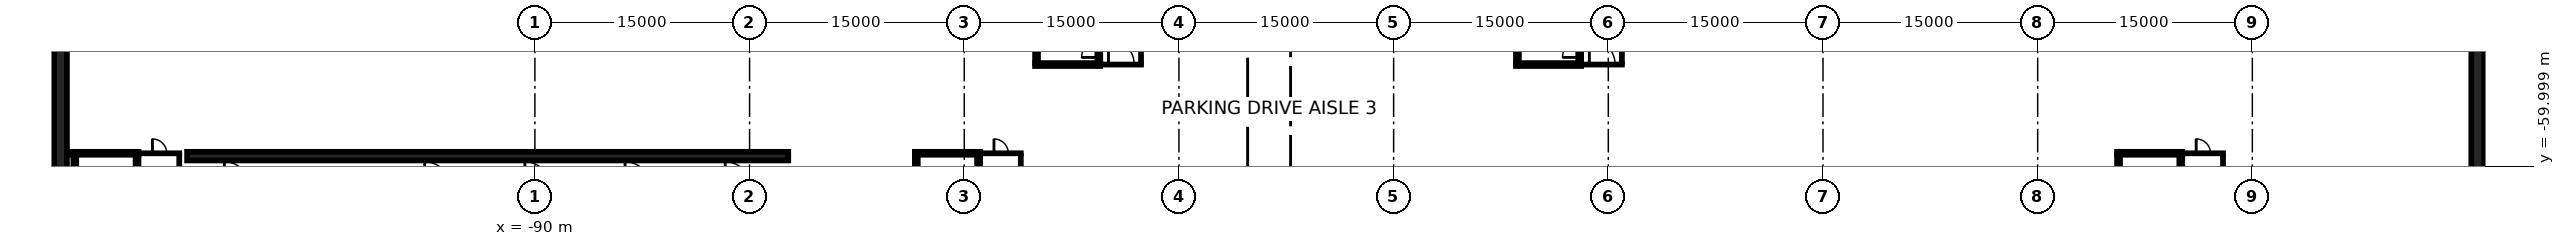
"""IFC4 building model, lengths in metres.
Left out: names, types, materials, properties, quantities, classifications, styles, units other than length and angle.
Written with IfcOpenShell. Run it as: python <this file> out.ifc"""

import sys

from ifc_helpers import new_model, si_unit, direction, frame, frame_2d, origin, place, context, subcontext, project, spatial, rectangle, extrude, element, fill, save


model = new_model("IFC4")
c1 = context("Model", 3, precision=1e-05, world=origin(), true_north=direction((0.0, 1.0)))
c2 = subcontext(c1, "Body", "Model", "MODEL_VIEW")
j1 = project(units=[si_unit("LENGTHUNIT", "METRE"), si_unit("PLANEANGLEUNIT", "RADIAN")], contexts=[c1])
p1 = place(None, origin())
s1 = spatial("IfcSite", under=j1, at=p1, CompositionType="ELEMENT")
p2 = place(p1, origin())
s2 = spatial("IfcBuilding", under=s1, at=p2, CompositionType="ELEMENT")
p3 = place(p2, frame((0.0, 0.0, -12.0)))
s3 = spatial("IfcBuildingStorey", under=s2, at=p3, CompositionType="ELEMENT", Elevation=-12.0)
for number, where, z_axis, x_axis in (
    (1, (-123.15, -80.0, 0.0), (0.0, 0.0, 1.0), (0.0, 1.0, 0.0)),
    (2, (45.75, -80.0, 0.0), (0.0, 0.0, 1.0), (0.0, 1.0, 0.0)),
):
    element("IfcWall", number, at=place(p3, frame(where, z_axis=z_axis, x_axis=x_axis)), inside=s3, PredefinedType="USERDEFINED", context=c2, shape_type="SweptSolid", body=[
        extrude(rectangle(XDim=160.0, YDim=0.9, at=frame_2d((80.0, 0.0))), origin(), (0.0, 0.0, 1.0), 11.55),
    ])
p4 = place(p3, frame((-58.9, -59.1, 0.0), z_axis=(0.0, 0.0, 1.0), x_axis=(1.0, 0.0, 0.0)))
e3 = element("IfcWall", 3, at=p4, inside=s3, PredefinedType="PARTITIONING", context=c2, shape_type="SweptSolid", body=[
    extrude(rectangle(XDim=2.95, YDim=0.2, at=frame_2d((1.475, 0.0))), origin(), (0.0, 0.0, 1.0), 4.4),
])
p5 = place(p4, frame((0.975, 0.0, 0.0)))
e4 = element("IfcOpeningElement", 4, at=p5, cuts=e3, PredefinedType="OPENING", context=c2, shape_type="SweptSolid", body=[
    extrude(rectangle(XDim=1.0, YDim=2.1, at=frame_2d((0.5, 1.05))), frame((0.0, 0.11, 0.0), z_axis=(0.0, -1.0, 0.0), x_axis=(1.0, 0.0, 0.0)), (0.0, 0.0, 1.0), 0.22),
])
p6 = place(p3, frame((-56.05, -64.8, 0.0), z_axis=(0.0, 0.0, 1.0), x_axis=(0.0, 1.0, 0.0)))
e5 = element("IfcWall", 5, at=p6, inside=s3, PredefinedType="PARTITIONING", context=c2, shape_type="SweptSolid", body=[
    extrude(rectangle(XDim=5.6, YDim=0.2, at=frame_2d((2.8, 0.0))), origin(), (0.0, 0.0, 1.0), 4.4),
])
p7 = place(p3, frame((-50.5, -52.9, 0.0), z_axis=(0.0, 0.0, 1.0), x_axis=(1.0, 0.0, 0.0)))
e6 = element("IfcWall", 6, at=p7, inside=s3, PredefinedType="PARTITIONING", context=c2, shape_type="SweptSolid", body=[
    extrude(rectangle(XDim=2.95, YDim=0.2, at=frame_2d((1.475, 0.0))), origin(), (0.0, 0.0, 1.0), 4.4),
])
p8 = place(p7, frame((0.575, 0.0, 0.0)))
e7 = element("IfcOpeningElement", 7, at=p8, cuts=e6, PredefinedType="OPENING", context=c2, shape_type="SweptSolid", body=[
    extrude(rectangle(XDim=1.8, YDim=2.1, at=frame_2d((0.9, 1.05))), frame((0.0, 0.11, 0.0), z_axis=(0.0, -1.0, 0.0), x_axis=(1.0, 0.0, 0.0)), (0.0, 0.0, 1.0), 0.22),
])
p9 = place(p3, frame((-47.65, -52.8, 0.0), z_axis=(0.0, 0.0, 1.0), x_axis=(0.0, 1.0, 0.0)))
e8 = element("IfcWall", 8, at=p9, inside=s3, PredefinedType="PARTITIONING", context=c2, shape_type="SweptSolid", body=[
    extrude(rectangle(XDim=3.6, YDim=0.2, at=frame_2d((1.8, 0.0))), origin(), (0.0, 0.0, 1.0), 4.4),
])
p10 = place(p3, frame((-16.9, -52.9, 0.0), z_axis=(0.0, 0.0, 1.0), x_axis=(1.0, 0.0, 0.0)))
e9 = element("IfcWall", 9, at=p10, inside=s3, PredefinedType="PARTITIONING", context=c2, shape_type="SweptSolid", body=[
    extrude(rectangle(XDim=2.95, YDim=0.2, at=frame_2d((1.475, 0.0))), origin(), (0.0, 0.0, 1.0), 4.4),
])
p11 = place(p10, frame((0.575, 0.0, 0.0)))
e10 = element("IfcOpeningElement", 10, at=p11, cuts=e9, PredefinedType="OPENING", context=c2, shape_type="SweptSolid", body=[
    extrude(rectangle(XDim=1.8, YDim=2.1, at=frame_2d((0.9, 1.05))), frame((0.0, 0.11, 0.0), z_axis=(0.0, -1.0, 0.0), x_axis=(1.0, 0.0, 0.0)), (0.0, 0.0, 1.0), 0.22),
])
p12 = place(p3, frame((-14.05, -52.8, 0.0), z_axis=(0.0, 0.0, 1.0), x_axis=(0.0, 1.0, 0.0)))
e11 = element("IfcWall", 11, at=p12, inside=s3, PredefinedType="PARTITIONING", context=c2, shape_type="SweptSolid", body=[
    extrude(rectangle(XDim=3.6, YDim=0.2, at=frame_2d((1.8, 0.0))), origin(), (0.0, 0.0, 1.0), 4.4),
])
p13 = place(p3, frame((25.1, -59.1, 0.0), z_axis=(0.0, 0.0, 1.0), x_axis=(1.0, 0.0, 0.0)))
e12 = element("IfcWall", 12, at=p13, inside=s3, PredefinedType="PARTITIONING", context=c2, shape_type="SweptSolid", body=[
    extrude(rectangle(XDim=2.95, YDim=0.2, at=frame_2d((1.475, 0.0))), origin(), (0.0, 0.0, 1.0), 4.4),
])
p14 = place(p13, frame((0.975, 0.0, 0.0)))
e13 = element("IfcOpeningElement", 13, at=p14, cuts=e12, PredefinedType="OPENING", context=c2, shape_type="SweptSolid", body=[
    extrude(rectangle(XDim=1.0, YDim=2.1, at=frame_2d((0.5, 1.05))), frame((0.0, 0.11, 0.0), z_axis=(0.0, -1.0, 0.0), x_axis=(1.0, 0.0, 0.0)), (0.0, 0.0, 1.0), 0.22),
])
p15 = place(p3, frame((27.95, -64.8, 0.0), z_axis=(0.0, 0.0, 1.0), x_axis=(0.0, 1.0, 0.0)))
e14 = element("IfcWall", 14, at=p15, inside=s3, PredefinedType="PARTITIONING", context=c2, shape_type="SweptSolid", body=[
    extrude(rectangle(XDim=5.6, YDim=0.2, at=frame_2d((2.8, 0.0))), origin(), (0.0, 0.0, 1.0), 4.4),
])
p16 = place(p3, frame((-117.7, -59.1, 0.0), z_axis=(0.0, 0.0, 1.0), x_axis=(1.0, 0.0, 0.0)))
e15 = element("IfcWall", 15, at=p16, inside=s3, PredefinedType="PARTITIONING", context=c2, shape_type="SweptSolid", body=[
    extrude(rectangle(XDim=2.95, YDim=0.2, at=frame_2d((1.475, 0.0))), origin(), (0.0, 0.0, 1.0), 4.4),
])
p17 = place(p16, frame((0.975, 0.0, 0.0)))
e16 = element("IfcOpeningElement", 16, at=p17, cuts=e15, PredefinedType="OPENING", context=c2, shape_type="SweptSolid", body=[
    extrude(rectangle(XDim=1.0, YDim=2.1, at=frame_2d((0.5, 1.05))), frame((0.0, 0.11, 0.0), z_axis=(0.0, -1.0, 0.0), x_axis=(1.0, 0.0, 0.0)), (0.0, 0.0, 1.0), 0.22),
])
p18 = place(p3, frame((-114.85, -64.8, 0.0), z_axis=(0.0, 0.0, 1.0), x_axis=(0.0, 1.0, 0.0)))
e17 = element("IfcWall", 17, at=p18, inside=s3, PredefinedType="PARTITIONING", context=c2, shape_type="SweptSolid", body=[
    extrude(rectangle(XDim=5.6, YDim=0.2, at=frame_2d((2.8, 0.0))), origin(), (0.0, 0.0, 1.0), 4.4),
])
p19 = place(p3, frame((-63.35, -68.8, 0.0), z_axis=(0.0, 0.0, 1.0), x_axis=(0.0, 1.0, 0.0)))
e18 = element("IfcWall", 18, at=p19, inside=s3, PredefinedType="SOLIDWALL", context=c2, shape_type="SweptSolid", body=[
    extrude(rectangle(XDim=9.6, YDim=0.2, at=frame_2d((4.8, 0.0))), origin(), (0.0, 0.0, 1.0), 4.4),
])
p20 = place(p3, frame((-59.0, -68.8, 0.0), z_axis=(0.0, 0.0, 1.0), x_axis=(0.0, 1.0, 0.0)))
e19 = element("IfcWall", 19, at=p20, inside=s3, PredefinedType="SOLIDWALL", context=c2, shape_type="SweptSolid", body=[
    extrude(rectangle(XDim=9.6, YDim=0.2, at=frame_2d((4.8, 0.0))), origin(), (0.0, 0.0, 1.0), 4.4),
])
p21 = place(p20, frame((0.4, 0.0, 0.0)))
e20 = element("IfcOpeningElement", 20, at=p21, cuts=e19, PredefinedType="OPENING", context=c2, shape_type="SweptSolid", body=[
    extrude(rectangle(XDim=1.2, YDim=2.1, at=frame_2d((0.6, 1.05))), frame((0.0, 0.11, 0.0), z_axis=(0.0, -1.0, 0.0), x_axis=(1.0, 0.0, 0.0)), (0.0, 0.0, 1.0), 0.22),
])
p22 = place(p3, frame((-63.45, -59.1, 0.0), z_axis=(0.0, 0.0, 1.0), x_axis=(1.0, 0.0, 0.0)))
e21 = element("IfcWall", 21, at=p22, inside=s3, PredefinedType="SOLIDWALL", context=c2, shape_type="SweptSolid", body=[
    extrude(rectangle(XDim=4.55, YDim=0.2, at=frame_2d((2.275, 0.0))), origin(), (0.0, 0.0, 1.0), 4.4),
])
p23 = place(p3, frame((-54.95, -52.8, 0.0), z_axis=(0.0, 0.0, 1.0), x_axis=(0.0, 1.0, 0.0)))
e22 = element("IfcWall", 22, at=p23, inside=s3, PredefinedType="SOLIDWALL", context=c2, shape_type="SweptSolid", body=[
    extrude(rectangle(XDim=9.6, YDim=0.2, at=frame_2d((4.8, 0.0))), origin(), (0.0, 0.0, 1.0), 4.4),
])
p24 = place(p3, frame((-50.6, -52.8, 0.0), z_axis=(0.0, 0.0, 1.0), x_axis=(0.0, 1.0, 0.0)))
e23 = element("IfcWall", 23, at=p24, inside=s3, PredefinedType="SOLIDWALL", context=c2, shape_type="SweptSolid", body=[
    extrude(rectangle(XDim=9.6, YDim=0.2, at=frame_2d((4.8, 0.0))), origin(), (0.0, 0.0, 1.0), 4.4),
])
p25 = place(p24, frame((0.4, 0.0, 0.0)))
e24 = element("IfcOpeningElement", 24, at=p25, cuts=e23, PredefinedType="OPENING", context=c2, shape_type="SweptSolid", body=[
    extrude(rectangle(XDim=1.2, YDim=2.1, at=frame_2d((0.6, 1.05))), frame((0.0, 0.11, 0.0), z_axis=(0.0, -1.0, 0.0), x_axis=(1.0, 0.0, 0.0)), (0.0, 0.0, 1.0), 0.22),
])
p26 = place(p3, frame((-50.5, -52.9, 0.0), z_axis=(0.0, 0.0, 1.0), x_axis=(-1.0, 0.0, 0.0)))
e25 = element("IfcWall", 25, at=p26, inside=s3, PredefinedType="SOLIDWALL", context=c2, shape_type="SweptSolid", body=[
    extrude(rectangle(XDim=4.55, YDim=0.2, at=frame_2d((2.275, 0.0))), origin(), (0.0, 0.0, 1.0), 4.4),
])
p27 = place(p3, frame((-21.35, -52.8, 0.0), z_axis=(0.0, 0.0, 1.0), x_axis=(0.0, 1.0, 0.0)))
e26 = element("IfcWall", 26, at=p27, inside=s3, PredefinedType="SOLIDWALL", context=c2, shape_type="SweptSolid", body=[
    extrude(rectangle(XDim=9.6, YDim=0.2, at=frame_2d((4.8, 0.0))), origin(), (0.0, 0.0, 1.0), 4.4),
])
p28 = place(p3, frame((-17.0, -52.8, 0.0), z_axis=(0.0, 0.0, 1.0), x_axis=(0.0, 1.0, 0.0)))
e27 = element("IfcWall", 27, at=p28, inside=s3, PredefinedType="SOLIDWALL", context=c2, shape_type="SweptSolid", body=[
    extrude(rectangle(XDim=9.6, YDim=0.2, at=frame_2d((4.8, 0.0))), origin(), (0.0, 0.0, 1.0), 4.4),
])
p29 = place(p28, frame((0.4, 0.0, 0.0)))
e28 = element("IfcOpeningElement", 28, at=p29, cuts=e27, PredefinedType="OPENING", context=c2, shape_type="SweptSolid", body=[
    extrude(rectangle(XDim=1.2, YDim=2.1, at=frame_2d((0.6, 1.05))), frame((0.0, 0.11, 0.0), z_axis=(0.0, -1.0, 0.0), x_axis=(1.0, 0.0, 0.0)), (0.0, 0.0, 1.0), 0.22),
])
p30 = place(p3, frame((-16.9, -52.9, 0.0), z_axis=(0.0, 0.0, 1.0), x_axis=(-1.0, 0.0, 0.0)))
e29 = element("IfcWall", 29, at=p30, inside=s3, PredefinedType="SOLIDWALL", context=c2, shape_type="SweptSolid", body=[
    extrude(rectangle(XDim=4.55, YDim=0.2, at=frame_2d((2.275, 0.0))), origin(), (0.0, 0.0, 1.0), 4.4),
])
p31 = place(p3, frame((20.65, -68.8, 0.0), z_axis=(0.0, 0.0, 1.0), x_axis=(0.0, 1.0, 0.0)))
e30 = element("IfcWall", 30, at=p31, inside=s3, PredefinedType="SOLIDWALL", context=c2, shape_type="SweptSolid", body=[
    extrude(rectangle(XDim=9.6, YDim=0.2, at=frame_2d((4.8, 0.0))), origin(), (0.0, 0.0, 1.0), 4.4),
])
p32 = place(p3, frame((25.0, -68.8, 0.0), z_axis=(0.0, 0.0, 1.0), x_axis=(0.0, 1.0, 0.0)))
e31 = element("IfcWall", 31, at=p32, inside=s3, PredefinedType="SOLIDWALL", context=c2, shape_type="SweptSolid", body=[
    extrude(rectangle(XDim=9.6, YDim=0.2, at=frame_2d((4.8, 0.0))), origin(), (0.0, 0.0, 1.0), 4.4),
])
p33 = place(p32, frame((0.4, 0.0, 0.0)))
e32 = element("IfcOpeningElement", 32, at=p33, cuts=e31, PredefinedType="OPENING", context=c2, shape_type="SweptSolid", body=[
    extrude(rectangle(XDim=1.2, YDim=2.1, at=frame_2d((0.6, 1.05))), frame((0.0, 0.11, 0.0), z_axis=(0.0, -1.0, 0.0), x_axis=(1.0, 0.0, 0.0)), (0.0, 0.0, 1.0), 0.22),
])
p34 = place(p3, frame((20.55, -59.1, 0.0), z_axis=(0.0, 0.0, 1.0), x_axis=(1.0, 0.0, 0.0)))
e33 = element("IfcWall", 33, at=p34, inside=s3, PredefinedType="SOLIDWALL", context=c2, shape_type="SweptSolid", body=[
    extrude(rectangle(XDim=4.55, YDim=0.2, at=frame_2d((2.275, 0.0))), origin(), (0.0, 0.0, 1.0), 4.4),
])
p35 = place(p3, frame((-122.15, -68.8, 0.0), z_axis=(0.0, 0.0, 1.0), x_axis=(0.0, 1.0, 0.0)))
e34 = element("IfcWall", 34, at=p35, inside=s3, PredefinedType="SOLIDWALL", context=c2, shape_type="SweptSolid", body=[
    extrude(rectangle(XDim=9.6, YDim=0.2, at=frame_2d((4.8, 0.0))), origin(), (0.0, 0.0, 1.0), 4.4),
])
p36 = place(p3, frame((-117.8, -68.8, 0.0), z_axis=(0.0, 0.0, 1.0), x_axis=(0.0, 1.0, 0.0)))
e35 = element("IfcWall", 35, at=p36, inside=s3, PredefinedType="SOLIDWALL", context=c2, shape_type="SweptSolid", body=[
    extrude(rectangle(XDim=9.6, YDim=0.2, at=frame_2d((4.8, 0.0))), origin(), (0.0, 0.0, 1.0), 4.4),
])
p37 = place(p36, frame((0.4, 0.0, 0.0)))
e36 = element("IfcOpeningElement", 36, at=p37, cuts=e35, PredefinedType="OPENING", context=c2, shape_type="SweptSolid", body=[
    extrude(rectangle(XDim=1.2, YDim=2.1, at=frame_2d((0.6, 1.05))), frame((0.0, 0.11, 0.0), z_axis=(0.0, -1.0, 0.0), x_axis=(1.0, 0.0, 0.0)), (0.0, 0.0, 1.0), 0.22),
])
p38 = place(p3, frame((-122.7, -59.1, 0.0), z_axis=(0.0, 0.0, 1.0), x_axis=(1.0, 0.0, 0.0)))
e37 = element("IfcWall", 37, at=p38, inside=s3, PredefinedType="SOLIDWALL", context=c2, shape_type="SweptSolid", body=[
    extrude(rectangle(XDim=5.0, YDim=0.2, at=frame_2d((2.5, 0.0))), origin(), (0.0, 0.0, 1.0), 4.4),
])
p39 = place(p3, frame((-114.3, -59.3, 0.0), z_axis=(0.0, 0.0, 1.0), x_axis=(1.0, 0.0, 0.0)))
e38 = element("IfcWall", 38, at=p39, inside=s3, PredefinedType="SOLIDWALL", context=c2, shape_type="SweptSolid", body=[
    extrude(rectangle(XDim=42.0, YDim=0.6, at=frame_2d((21.0, 0.0))), origin(), (0.0, 0.0, 1.0), 4.4),
])
p40 = place(p5, origin())
e39 = element("IfcDoor", 39, at=p40, inside=s3, OperationType="SINGLE_SWING_LEFT", PredefinedType="DOOR", context=c2, shape_type="SweptSolid", body=[
    extrude(rectangle(XDim=1.0, YDim=2.1, at=frame_2d((0.5, 1.05))), frame((0.0, 0.025, 0.0), z_axis=(0.0, -1.0, 0.0), x_axis=(1.0, 0.0, 0.0)), (0.0, 0.0, 1.0), 0.05),
])
fill(e4, e39)
p41 = place(p8, origin())
e40 = element("IfcDoor", 40, at=p41, inside=s3, OperationType="DOUBLE_DOOR_SINGLE_SWING", PredefinedType="DOOR", context=c2, shape_type="SweptSolid", body=[
    extrude(rectangle(XDim=1.8, YDim=2.1, at=frame_2d((0.9, 1.05))), frame((0.0, 0.025, 0.0), z_axis=(0.0, -1.0, 0.0), x_axis=(1.0, 0.0, 0.0)), (0.0, 0.0, 1.0), 0.05),
])
fill(e7, e40)
p42 = place(p11, origin())
e41 = element("IfcDoor", 41, at=p42, inside=s3, OperationType="DOUBLE_DOOR_SINGLE_SWING", PredefinedType="DOOR", context=c2, shape_type="SweptSolid", body=[
    extrude(rectangle(XDim=1.8, YDim=2.1, at=frame_2d((0.9, 1.05))), frame((0.0, 0.025, 0.0), z_axis=(0.0, -1.0, 0.0), x_axis=(1.0, 0.0, 0.0)), (0.0, 0.0, 1.0), 0.05),
])
fill(e10, e41)
p43 = place(p14, origin())
e42 = element("IfcDoor", 42, at=p43, inside=s3, OperationType="SINGLE_SWING_LEFT", PredefinedType="DOOR", context=c2, shape_type="SweptSolid", body=[
    extrude(rectangle(XDim=1.0, YDim=2.1, at=frame_2d((0.5, 1.05))), frame((0.0, 0.025, 0.0), z_axis=(0.0, -1.0, 0.0), x_axis=(1.0, 0.0, 0.0)), (0.0, 0.0, 1.0), 0.05),
])
fill(e13, e42)
p44 = place(p17, origin())
e43 = element("IfcDoor", 43, at=p44, inside=s3, OperationType="SINGLE_SWING_LEFT", PredefinedType="DOOR", context=c2, shape_type="SweptSolid", body=[
    extrude(rectangle(XDim=1.0, YDim=2.1, at=frame_2d((0.5, 1.05))), frame((0.0, 0.025, 0.0), z_axis=(0.0, -1.0, 0.0), x_axis=(1.0, 0.0, 0.0)), (0.0, 0.0, 1.0), 0.05),
])
fill(e16, e43)
p45 = place(p25, origin())
e44 = element("IfcDoor", 44, at=p45, inside=s3, OperationType="SINGLE_SWING_LEFT", PredefinedType="DOOR", context=c2, shape_type="SweptSolid", body=[
    extrude(rectangle(XDim=1.2, YDim=2.1, at=frame_2d((0.6, 1.05))), frame((0.0, 0.025, 0.0), z_axis=(0.0, -1.0, 0.0), x_axis=(1.0, 0.0, 0.0)), (0.0, 0.0, 1.0), 0.05),
])
fill(e24, e44)
p46 = place(p29, origin())
e45 = element("IfcDoor", 45, at=p46, inside=s3, OperationType="SINGLE_SWING_LEFT", PredefinedType="DOOR", context=c2, shape_type="SweptSolid", body=[
    extrude(rectangle(XDim=1.2, YDim=2.1, at=frame_2d((0.6, 1.05))), frame((0.0, 0.025, 0.0), z_axis=(0.0, -1.0, 0.0), x_axis=(1.0, 0.0, 0.0)), (0.0, 0.0, 1.0), 0.05),
])
fill(e28, e45)
save(model, sys.argv[1])
